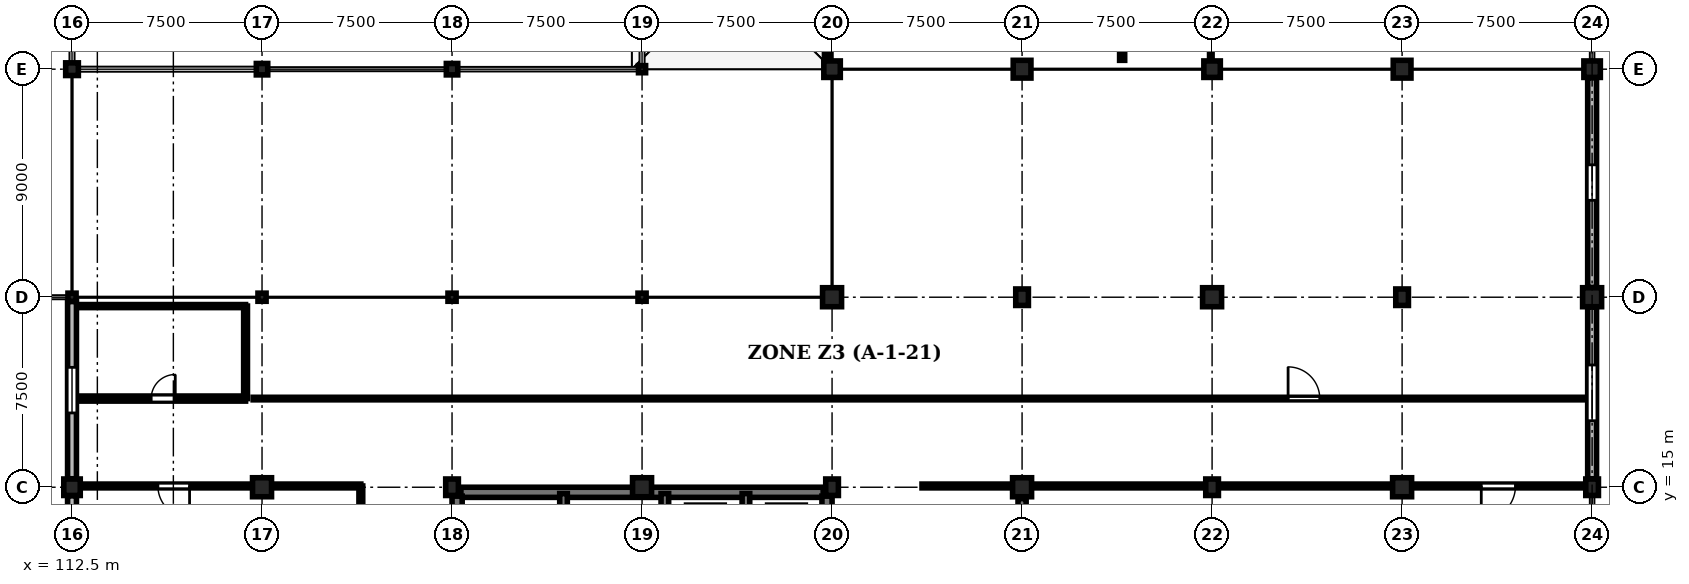
"""IFC4 building model, lengths in metres.
Left out: names, types, materials, properties, quantities, classifications, styles, units other than length and angle.
Written with IfcOpenShell. Run it as: python <this file> out.ifc"""

import sys

from ifc_helpers import new_model, si_unit, direction, frame, frame_2d, origin, origin_2d, place, context, subcontext, project, spatial, rectangle, extrude, element, fill, save


model = new_model("IFC4")
c1 = context("Model", 3, precision=1e-05, world=origin(), true_north=direction((0.0, 1.0)))
c2 = subcontext(c1, "Body", "Model", "MODEL_VIEW")
j1 = project(units=[si_unit("LENGTHUNIT", "METRE"), si_unit("PLANEANGLEUNIT", "RADIAN")], contexts=[c1])
p1 = place(None, origin())
s1 = spatial("IfcSite", under=j1, at=p1, CompositionType="ELEMENT")
p2 = place(p1, origin())
s2 = spatial("IfcBuilding", under=s1, at=p2, CompositionType="ELEMENT")
p3 = place(p2, frame((0.0, 0.0, 4.8)))
s3 = spatial("IfcBuildingStorey", under=s2, at=p3, CompositionType="ELEMENT", Elevation=4.8)
p4 = place(p3, frame((112.5, 15.0, 0.0), z_axis=(0.0, 0.0, 1.0), x_axis=(1.0, 0.0, 0.0)))
e1 = element("IfcColumn", 1, at=p4, inside=s3, PredefinedType="COLUMN", context=c2, shape_type="SweptSolid", body=[
    extrude(rectangle(XDim=0.65, YDim=0.65, at=origin_2d()), origin(), (0.0, 0.0, 1.0), 4.5),
])
p5 = place(p3, frame((112.5, 22.5, 0.0), z_axis=(0.0, 0.0, 1.0), x_axis=(1.0, 0.0, 0.0)))
e2 = element("IfcColumn", 2, at=p5, inside=s3, PredefinedType="COLUMN", context=c2, shape_type="SweptSolid", body=[
    extrude(rectangle(XDim=0.32, YDim=0.32, at=origin_2d()), origin(), (0.0, 0.0, 1.0), 4.5),
])
p6 = place(p3, frame((112.5, 31.5, 0.0), z_axis=(0.0, 0.0, 1.0), x_axis=(1.0, 0.0, 0.0)))
e3 = element("IfcColumn", 3, at=p6, inside=s3, PredefinedType="COLUMN", context=c2, shape_type="SweptSolid", body=[
    extrude(rectangle(XDim=0.5, YDim=0.5, at=origin_2d()), origin(), (0.0, 0.0, 1.0), 4.5),
])
p7 = place(p3, frame((120.0, 15.0, 0.0), z_axis=(0.0, 0.0, 1.0), x_axis=(1.0, 0.0, 0.0)))
e4 = element("IfcColumn", 4, at=p7, inside=s3, PredefinedType="COLUMN", context=c2, shape_type="SweptSolid", body=[
    extrude(rectangle(XDim=0.75, YDim=0.75, at=origin_2d()), origin(), (0.0, 0.0, 1.0), 4.5),
])
p8 = place(p3, frame((120.0, 22.5, 0.0), z_axis=(0.0, 0.0, 1.0), x_axis=(1.0, 0.0, 0.0)))
e5 = element("IfcColumn", 5, at=p8, inside=s3, PredefinedType="COLUMN", context=c2, shape_type="SweptSolid", body=[
    extrude(rectangle(XDim=0.32, YDim=0.32, at=origin_2d()), origin(), (0.0, 0.0, 1.0), 4.5),
])
p9 = place(p3, frame((120.0, 31.5, 0.0), z_axis=(0.0, 0.0, 1.0), x_axis=(1.0, 0.0, 0.0)))
e6 = element("IfcColumn", 6, at=p9, inside=s3, PredefinedType="COLUMN", context=c2, shape_type="SweptSolid", body=[
    extrude(rectangle(XDim=0.45, YDim=0.45, at=origin_2d()), origin(), (0.0, 0.0, 1.0), 4.5),
])
p10 = place(p3, frame((127.5, 15.0, 0.0), z_axis=(0.0, 0.0, 1.0), x_axis=(1.0, 0.0, 0.0)))
e7 = element("IfcColumn", 7, at=p10, inside=s3, PredefinedType="COLUMN", context=c2, shape_type="SweptSolid", body=[
    extrude(rectangle(XDim=0.5, YDim=0.65, at=origin_2d()), origin(), (0.0, 0.0, 1.0), 4.5),
])
p11 = place(p3, frame((127.5, 22.5, 0.0), z_axis=(0.0, 0.0, 1.0), x_axis=(1.0, 0.0, 0.0)))
e8 = element("IfcColumn", 8, at=p11, inside=s3, PredefinedType="COLUMN", context=c2, shape_type="SweptSolid", body=[
    extrude(rectangle(XDim=0.32, YDim=0.32, at=origin_2d()), origin(), (0.0, 0.0, 1.0), 4.5),
])
p12 = place(p3, frame((127.5, 31.5, 0.0), z_axis=(0.0, 0.0, 1.0), x_axis=(1.0, 0.0, 0.0)))
e9 = element("IfcColumn", 9, at=p12, inside=s3, PredefinedType="COLUMN", context=c2, shape_type="SweptSolid", body=[
    extrude(rectangle(XDim=0.45, YDim=0.45, at=origin_2d()), origin(), (0.0, 0.0, 1.0), 4.5),
])
p13 = place(p3, frame((135.0, 15.0, 0.0), z_axis=(0.0, 0.0, 1.0), x_axis=(1.0, 0.0, 0.0)))
e10 = element("IfcColumn", 10, at=p13, inside=s3, PredefinedType="COLUMN", context=c2, shape_type="SweptSolid", body=[
    extrude(rectangle(XDim=0.75, YDim=0.75, at=origin_2d()), origin(), (0.0, 0.0, 1.0), 4.5),
])
p14 = place(p3, frame((135.0, 22.5, 0.0), z_axis=(0.0, 0.0, 1.0), x_axis=(1.0, 0.0, 0.0)))
e11 = element("IfcColumn", 11, at=p14, inside=s3, PredefinedType="COLUMN", context=c2, shape_type="SweptSolid", body=[
    extrude(rectangle(XDim=0.32, YDim=0.32, at=origin_2d()), origin(), (0.0, 0.0, 1.0), 4.5),
])
p15 = place(p3, frame((135.0, 31.5, 0.0), z_axis=(0.0, 0.0, 1.0), x_axis=(1.0, 0.0, 0.0)))
e12 = element("IfcColumn", 12, at=p15, inside=s3, PredefinedType="COLUMN", context=c2, shape_type="SweptSolid", body=[
    extrude(rectangle(XDim=0.28, YDim=0.28, at=origin_2d()), origin(), (0.0, 0.0, 1.0), 4.5),
])
p16 = place(p3, frame((142.5, 15.0, 0.0), z_axis=(0.0, 0.0, 1.0), x_axis=(1.0, 0.0, 0.0)))
e13 = element("IfcColumn", 13, at=p16, inside=s3, PredefinedType="COLUMN", context=c2, shape_type="SweptSolid", body=[
    extrude(rectangle(XDim=0.5, YDim=0.65, at=origin_2d()), origin(), (0.0, 0.0, 1.0), 4.5),
])
p17 = place(p3, frame((142.5, 22.5, 0.0), z_axis=(0.0, 0.0, 1.0), x_axis=(1.0, 0.0, 0.0)))
e14 = element("IfcColumn", 14, at=p17, inside=s3, PredefinedType="COLUMN", context=c2, shape_type="SweptSolid", body=[
    extrude(rectangle(XDim=0.75, YDim=0.75, at=origin_2d()), origin(), (0.0, 0.0, 1.0), 4.5),
])
p18 = place(p3, frame((142.5, 31.5, 0.0), z_axis=(0.0, 0.0, 1.0), x_axis=(1.0, 0.0, 0.0)))
e15 = element("IfcColumn", 15, at=p18, inside=s3, PredefinedType="COLUMN", context=c2, shape_type="SweptSolid", body=[
    extrude(rectangle(XDim=0.65, YDim=0.65, at=origin_2d()), origin(), (0.0, 0.0, 1.0), 4.5),
])
p19 = place(p3, frame((150.0, 15.0, 0.0), z_axis=(0.0, 0.0, 1.0), x_axis=(1.0, 0.0, 0.0)))
e16 = element("IfcColumn", 16, at=p19, inside=s3, PredefinedType="COLUMN", context=c2, shape_type="SweptSolid", body=[
    extrude(rectangle(XDim=0.75, YDim=0.75, at=origin_2d()), origin(), (0.0, 0.0, 1.0), 4.5),
])
p20 = place(p3, frame((150.0, 22.5, 0.0), z_axis=(0.0, 0.0, 1.0), x_axis=(1.0, 0.0, 0.0)))
e17 = element("IfcColumn", 17, at=p20, inside=s3, PredefinedType="COLUMN", context=c2, shape_type="SweptSolid", body=[
    extrude(rectangle(XDim=0.5, YDim=0.65, at=origin_2d()), origin(), (0.0, 0.0, 1.0), 4.5),
])
p21 = place(p3, frame((150.0, 31.5, 0.0), z_axis=(0.0, 0.0, 1.0), x_axis=(1.0, 0.0, 0.0)))
e18 = element("IfcColumn", 18, at=p21, inside=s3, PredefinedType="COLUMN", context=c2, shape_type="SweptSolid", body=[
    extrude(rectangle(XDim=0.7, YDim=0.7, at=origin_2d()), origin(), (0.0, 0.0, 1.0), 4.5),
])
p22 = place(p3, frame((157.5, 15.0, 0.0), z_axis=(0.0, 0.0, 1.0), x_axis=(1.0, 0.0, 0.0)))
e19 = element("IfcColumn", 19, at=p22, inside=s3, PredefinedType="COLUMN", context=c2, shape_type="SweptSolid", body=[
    extrude(rectangle(XDim=0.5, YDim=0.65, at=origin_2d()), origin(), (0.0, 0.0, 1.0), 4.5),
])
p23 = place(p3, frame((157.5, 22.5, 0.0), z_axis=(0.0, 0.0, 1.0), x_axis=(1.0, 0.0, 0.0)))
e20 = element("IfcColumn", 20, at=p23, inside=s3, PredefinedType="COLUMN", context=c2, shape_type="SweptSolid", body=[
    extrude(rectangle(XDim=0.75, YDim=0.75, at=origin_2d()), origin(), (0.0, 0.0, 1.0), 4.5),
])
p24 = place(p3, frame((157.5, 31.5, 0.0), z_axis=(0.0, 0.0, 1.0), x_axis=(1.0, 0.0, 0.0)))
e21 = element("IfcColumn", 21, at=p24, inside=s3, PredefinedType="COLUMN", context=c2, shape_type="SweptSolid", body=[
    extrude(rectangle(XDim=0.65, YDim=0.65, at=origin_2d()), origin(), (0.0, 0.0, 1.0), 4.5),
])
p25 = place(p3, frame((165.0, 15.0, 0.0), z_axis=(0.0, 0.0, 1.0), x_axis=(1.0, 0.0, 0.0)))
e22 = element("IfcColumn", 22, at=p25, inside=s3, PredefinedType="COLUMN", context=c2, shape_type="SweptSolid", body=[
    extrude(rectangle(XDim=0.75, YDim=0.75, at=origin_2d()), origin(), (0.0, 0.0, 1.0), 4.5),
])
p26 = place(p3, frame((165.0, 22.5, 0.0), z_axis=(0.0, 0.0, 1.0), x_axis=(1.0, 0.0, 0.0)))
e23 = element("IfcColumn", 23, at=p26, inside=s3, PredefinedType="COLUMN", context=c2, shape_type="SweptSolid", body=[
    extrude(rectangle(XDim=0.5, YDim=0.65, at=origin_2d()), origin(), (0.0, 0.0, 1.0), 4.5),
])
p27 = place(p3, frame((165.0, 31.5, 0.0), z_axis=(0.0, 0.0, 1.0), x_axis=(1.0, 0.0, 0.0)))
e24 = element("IfcColumn", 24, at=p27, inside=s3, PredefinedType="COLUMN", context=c2, shape_type="SweptSolid", body=[
    extrude(rectangle(XDim=0.7, YDim=0.7, at=origin_2d()), origin(), (0.0, 0.0, 1.0), 4.5),
])
p28 = place(p3, frame((172.5, 15.0, 0.0), z_axis=(0.0, 0.0, 1.0), x_axis=(1.0, 0.0, 0.0)))
e25 = element("IfcColumn", 25, at=p28, inside=s3, PredefinedType="COLUMN", context=c2, shape_type="SweptSolid", body=[
    extrude(rectangle(XDim=0.5, YDim=0.65, at=origin_2d()), origin(), (0.0, 0.0, 1.0), 4.5),
])
p29 = place(p3, frame((172.5, 22.5, 0.0), z_axis=(0.0, 0.0, 1.0), x_axis=(1.0, 0.0, 0.0)))
e26 = element("IfcColumn", 26, at=p29, inside=s3, PredefinedType="COLUMN", context=c2, shape_type="SweptSolid", body=[
    extrude(rectangle(XDim=0.75, YDim=0.75, at=origin_2d()), origin(), (0.0, 0.0, 1.0), 4.5),
])
p30 = place(p3, frame((172.5, 31.5, 0.0), z_axis=(0.0, 0.0, 1.0), x_axis=(1.0, 0.0, 0.0)))
e27 = element("IfcColumn", 27, at=p30, inside=s3, PredefinedType="COLUMN", context=c2, shape_type="SweptSolid", body=[
    extrude(rectangle(XDim=0.65, YDim=0.65, at=origin_2d()), origin(), (0.0, 0.0, 1.0), 4.5),
])
p31 = place(p3, frame((150.0, 7.95, 0.0), z_axis=(0.0, 0.0, 1.0), x_axis=(0.0, 1.0, 0.0)))
e28 = element("IfcWall", 28, at=p31, inside=s3, PredefinedType="SHEAR", context=c2, shape_type="SweptSolid", body=[
    extrude(rectangle(XDim=6.6, YDim=0.32, at=frame_2d((3.3, 0.0))), origin(), (0.0, 0.0, 1.0), 3.63),
])
p32 = place(p3, frame((112.5, 7.86, 0.0), z_axis=(0.0, 0.0, 1.0), x_axis=(0.0, 1.0, 0.0)))
e29 = element("IfcWall", 29, at=p32, inside=s3, PredefinedType="STANDARD", context=c2, shape_type="SweptSolid", body=[
    extrude(rectangle(XDim=6.805, YDim=0.35, at=frame_2d((3.402, 0.0))), origin(), (0.0, 0.0, 1.0), 3.63),
])
p33 = place(p32, frame((2.202, 0.0, 0.9)))
e30 = element("IfcOpeningElement", 30, at=p33, cuts=e29, PredefinedType="OPENING", context=c2, shape_type="SweptSolid", body=[
    extrude(rectangle(XDim=2.4, YDim=2.45, at=frame_2d((1.2, 1.225))), frame((0.0, 0.185, 0.0), z_axis=(0.0, -1.0, 0.0), x_axis=(1.0, 0.0, 0.0)), (0.0, 0.0, 1.0), 0.37),
])
p34 = place(p3, frame((112.5, 15.335, 0.0), z_axis=(0.0, 0.0, 1.0), x_axis=(0.0, 1.0, 0.0)))
e31 = element("IfcWall", 31, at=p34, inside=s3, PredefinedType="STANDARD", context=c2, shape_type="SweptSolid", body=[
    extrude(rectangle(XDim=6.995, YDim=0.35, at=frame_2d((3.498, 0.0))), origin(), (0.0, 0.0, 1.0), 3.63),
])
p35 = place(p34, frame((2.597, 0.0, 0.9)))
e32 = element("IfcOpeningElement", 32, at=p35, cuts=e31, PredefinedType="OPENING", context=c2, shape_type="SweptSolid", body=[
    extrude(rectangle(XDim=1.8, YDim=2.1, at=frame_2d((0.9, 1.05))), frame((0.0, 0.185, 0.0), z_axis=(0.0, -1.0, 0.0), x_axis=(1.0, 0.0, 0.0)), (0.0, 0.0, 1.0), 0.37),
])
p36 = place(p3, frame((172.5, 22.115, 0.0), z_axis=(0.0, 0.0, 1.0), x_axis=(0.0, -1.0, 0.0)))
e33 = element("IfcWall", 33, at=p36, inside=s3, PredefinedType="STANDARD", context=c2, shape_type="SweptSolid", body=[
    extrude(rectangle(XDim=6.78, YDim=0.35, at=frame_2d((3.39, 0.0))), origin(), (0.0, 0.0, 1.0), 3.63),
])
p37 = place(p36, frame((2.29, 0.0, 0.9)))
e34 = element("IfcOpeningElement", 34, at=p37, cuts=e33, PredefinedType="OPENING", context=c2, shape_type="SweptSolid", body=[
    extrude(rectangle(XDim=2.2, YDim=1.95, at=frame_2d((1.1, 0.975))), frame((0.0, 0.185, 0.0), z_axis=(0.0, -1.0, 0.0), x_axis=(1.0, 0.0, 0.0)), (0.0, 0.0, 1.0), 0.37),
])
p38 = place(p3, frame((172.5, 31.165, 0.0), z_axis=(0.0, 0.0, 1.0), x_axis=(0.0, -1.0, 0.0)))
e35 = element("IfcWall", 35, at=p38, inside=s3, PredefinedType="STANDARD", context=c2, shape_type="SweptSolid", body=[
    extrude(rectangle(XDim=8.28, YDim=0.35, at=frame_2d((4.14, 0.0))), origin(), (0.0, 0.0, 1.0), 3.63),
])
p39 = place(p38, frame((3.44, 0.0, 0.9)))
e36 = element("IfcOpeningElement", 36, at=p39, cuts=e35, PredefinedType="OPENING", context=c2, shape_type="SweptSolid", body=[
    extrude(rectangle(XDim=1.4, YDim=1.8, at=frame_2d((0.7, 0.9))), frame((0.0, 0.185, 0.0), z_axis=(0.0, -1.0, 0.0), x_axis=(1.0, 0.0, 0.0)), (0.0, 0.0, 1.0), 0.37),
])
p40 = place(p3, frame((127.85, 14.8, 0.0), z_axis=(0.0, 0.0, 1.0), x_axis=(1.0, 0.0, 0.0)))
e37 = element("IfcWall", 37, at=p40, inside=s3, PredefinedType="SHEAR", context=c2, shape_type="SweptSolid", body=[
    extrude(rectangle(XDim=14.3, YDim=0.4, at=frame_2d((7.15, 0.0))), origin(), (0.0, 0.0, 1.0), 4.18),
])
p41 = place(p3, frame((127.7, 7.85, 0.0), z_axis=(0.0, 0.0, 1.0), x_axis=(0.0, 1.0, 0.0)))
e38 = element("IfcWall", 38, at=p41, inside=s3, PredefinedType="SHEAR", context=c2, shape_type="SweptSolid", body=[
    extrude(rectangle(XDim=6.8, YDim=0.4, at=frame_2d((3.4, 0.0))), origin(), (0.0, 0.0, 1.0), 4.18),
])
p42 = place(p3, frame((142.3, 11.6, 0.0), z_axis=(0.0, 0.0, 1.0), x_axis=(0.0, 1.0, 0.0)))
e39 = element("IfcWall", 39, at=p42, inside=s3, PredefinedType="SHEAR", context=c2, shape_type="SweptSolid", body=[
    extrude(rectangle(XDim=3.05, YDim=0.4, at=frame_2d((1.525, 0.0))), origin(), (0.0, 0.0, 1.0), 4.18),
])
for number, where, z_axis, x_axis in (
    (40, (131.9, 11.6, 0.0), (0.0, 0.0, 1.0), (0.0, 1.0, 0.0)),
    (41, (135.9, 11.6, 0.0), (0.0, 0.0, 1.0), (0.0, 1.0, 0.0)),
    (42, (139.1, 11.6, 0.0), (0.0, 0.0, 1.0), (0.0, 1.0, 0.0)),
):
    element("IfcWall", number, at=place(p3, frame(where, z_axis=z_axis, x_axis=x_axis)), inside=s3, PredefinedType="SHEAR", context=c2, shape_type="SweptSolid", body=[
        extrude(rectangle(XDim=3.15, YDim=0.3, at=frame_2d((1.575, 0.0))), origin(), (0.0, 0.0, 1.0), 4.18),
    ])
p43 = place(p3, frame((142.3, 31.5, 0.0), z_axis=(0.0, 0.0, 1.0), x_axis=(0.0, 1.0, 0.0)))
e43 = element("IfcWall", 43, at=p43, inside=s3, PredefinedType="STANDARD", context=c2, shape_type="SweptSolid", body=[
    extrude(rectangle(XDim=44.65, YDim=0.2, at=frame_2d((22.325, 0.0))), origin(), (0.0, 0.0, 1.0), 3.615),
])
p44 = place(p43, frame((26.11, 0.0, 0.0)))
e44 = element("IfcOpeningElement", 44, at=p44, cuts=e43, PredefinedType="OPENING", context=c2, shape_type="SweptSolid", body=[
    extrude(rectangle(XDim=1.05, YDim=2.2, at=frame_2d((0.525, 1.1))), frame((0.0, 0.11, 0.0), z_axis=(0.0, -1.0, 0.0), x_axis=(1.0, 0.0, 0.0)), (0.0, 0.0, 1.0), 0.22),
])
p45 = place(p3, frame((172.15, 15.05, 0.0), z_axis=(0.0, 0.0, 1.0), x_axis=(-1.0, 0.0, 0.0)))
e45 = element("IfcWall", 45, at=p45, inside=s3, PredefinedType="PARTITIONING", context=c2, shape_type="SweptSolid", body=[
    extrude(rectangle(XDim=26.1, YDim=0.15, at=frame_2d((13.05, 0.0))), origin(), (0.0, 0.0, 1.0), 3.515),
])
p46 = place(p45, frame((2.675, 0.0, 0.0)))
e46 = element("IfcOpeningElement", 46, at=p46, cuts=e45, PredefinedType="OPENING", context=c2, shape_type="SweptSolid", body=[
    extrude(rectangle(XDim=1.35, YDim=2.25, at=frame_2d((0.675, 1.125))), frame((0.0, 0.085, 0.0), z_axis=(0.0, -1.0, 0.0), x_axis=(1.0, 0.0, 0.0)), (0.0, 0.0, 1.0), 0.17),
])
p47 = place(p3, frame((123.9, 15.05, 0.0), z_axis=(0.0, 0.0, 1.0), x_axis=(-1.0, 0.0, 0.0)))
e47 = element("IfcWall", 47, at=p47, inside=s3, PredefinedType="PARTITIONING", context=c2, shape_type="SweptSolid", body=[
    extrude(rectangle(XDim=11.05, YDim=0.15, at=frame_2d((5.525, 0.0))), origin(), (0.0, 0.0, 1.0), 3.515),
])
p48 = place(p47, frame((6.76, 0.0, 0.0)))
e48 = element("IfcOpeningElement", 48, at=p48, cuts=e47, PredefinedType="OPENING", context=c2, shape_type="SweptSolid", body=[
    extrude(rectangle(XDim=1.25, YDim=2.2, at=frame_2d((0.625, 1.1))), frame((0.0, 0.085, 0.0), z_axis=(0.0, -1.0, 0.0), x_axis=(1.0, 0.0, 0.0)), (0.0, 0.0, 1.0), 0.17),
])
p49 = place(p3, frame((112.85, 18.5, 0.0), z_axis=(0.0, 0.0, 1.0), x_axis=(1.0, 0.0, 0.0)))
e49 = element("IfcWall", 49, at=p49, inside=s3, PredefinedType="STANDARD", context=c2, shape_type="SweptSolid", body=[
    extrude(rectangle(XDim=6.5, YDim=0.2, at=frame_2d((3.25, 0.0))), origin(), (0.0, 0.0, 1.0), 4.165),
])
p50 = place(p49, frame((2.775, 0.0, 0.0)))
e50 = element("IfcOpeningElement", 50, at=p50, cuts=e49, PredefinedType="OPENING", context=c2, shape_type="SweptSolid", body=[
    extrude(rectangle(XDim=0.95, YDim=2.15, at=frame_2d((0.475, 1.075))), frame((0.0, 0.11, 0.0), z_axis=(0.0, -1.0, 0.0), x_axis=(1.0, 0.0, 0.0)), (0.0, 0.0, 1.0), 0.22),
])
p51 = place(p3, frame((119.65, 18.5, 0.0), z_axis=(0.0, 0.0, 1.0), x_axis=(1.0, 0.0, 0.0)))
e51 = element("IfcWall", 51, at=p51, inside=s3, PredefinedType="PARTITIONING", context=c2, shape_type="SweptSolid", body=[
    extrude(rectangle(XDim=52.5, YDim=0.1, at=frame_2d((26.25, 0.0))), origin(), (0.0, 0.0, 1.0), 4.165),
])
p52 = place(p51, frame((40.85, 0.0, 0.0)))
e52 = element("IfcOpeningElement", 52, at=p52, cuts=e51, PredefinedType="OPENING", context=c2, shape_type="SweptSolid", body=[
    extrude(rectangle(XDim=1.25, YDim=2.2, at=frame_2d((0.625, 1.1))), frame((0.0, 0.06, 0.0), z_axis=(0.0, -1.0, 0.0), x_axis=(1.0, 0.0, 0.0)), (0.0, 0.0, 1.0), 0.12),
])
p53 = place(p3, frame((153.95, 31.85, 0.0), z_axis=(0.0, 0.0, 1.0), x_axis=(0.0, 1.0, 0.0)))
e53 = element("IfcWall", 53, at=p53, inside=s3, PredefinedType="STANDARD", context=c2, shape_type="SweptSolid", body=[
    extrude(rectangle(XDim=16.15, YDim=0.2, at=frame_2d((8.075, 0.0))), origin(), (0.0, 0.0, 1.0), 3.765),
])
p54 = place(p53, frame((10.47, 0.0, 0.0)))
e54 = element("IfcOpeningElement", 54, at=p54, cuts=e53, PredefinedType="OPENING", context=c2, shape_type="SweptSolid", body=[
    extrude(rectangle(XDim=1.05, YDim=2.2, at=frame_2d((0.525, 1.1))), frame((0.0, 0.11, 0.0), z_axis=(0.0, -1.0, 0.0), x_axis=(1.0, 0.0, 0.0)), (0.0, 0.0, 1.0), 0.22),
])
p55 = place(p3, frame((157.45, 38.75, 0.0), z_axis=(0.0, 0.0, 1.0), x_axis=(0.0, -1.0, 0.0)))
e55 = element("IfcWall", 55, at=p55, inside=s3, PredefinedType="PARTITIONING", context=c2, shape_type="SweptSolid", body=[
    extrude(rectangle(XDim=6.9, YDim=0.1, at=frame_2d((3.45, 0.0))), origin(), (0.0, 0.0, 1.0), 3.565),
])
p56 = place(p55, frame((2.925, 0.0, 0.0)))
e56 = element("IfcOpeningElement", 56, at=p56, cuts=e55, PredefinedType="OPENING", context=c2, shape_type="SweptSolid", body=[
    extrude(rectangle(XDim=1.05, YDim=2.2, at=frame_2d((0.525, 1.1))), frame((0.0, 0.06, 0.0), z_axis=(0.0, -1.0, 0.0), x_axis=(1.0, 0.0, 0.0)), (0.0, 0.0, 1.0), 0.12),
])
p57 = place(p3, frame((123.9, 7.85, 0.0), z_axis=(0.0, 0.0, 1.0), x_axis=(0.0, 1.0, 0.0)))
e57 = element("IfcWall", 57, at=p57, inside=s3, PredefinedType="PARTITIONING", context=c2, shape_type="SweptSolid", body=[
    extrude(rectangle(XDim=7.2, YDim=0.15, at=frame_2d((3.6, 0.0))), origin(), (0.0, 0.0, 1.0), 4.165),
])
p58 = place(p3, frame((119.35, 18.5, 0.0), z_axis=(0.0, 0.0, 1.0), x_axis=(0.0, 1.0, 0.0)))
e58 = element("IfcWall", 58, at=p58, inside=s3, PredefinedType="PARTITIONING", context=c2, shape_type="SweptSolid", body=[
    extrude(rectangle(XDim=3.65, YDim=0.15, at=frame_2d((1.825, 0.0))), origin(), (0.0, 0.0, 1.0), 4.165),
])
p59 = place(p3, frame((112.85, 22.15, 0.0), z_axis=(0.0, 0.0, 1.0), x_axis=(1.0, 0.0, 0.0)))
e59 = element("IfcWall", 59, at=p59, inside=s3, PredefinedType="PARTITIONING", context=c2, shape_type="SweptSolid", body=[
    extrude(rectangle(XDim=6.5, YDim=0.12, at=frame_2d((3.25, 0.0))), origin(), (0.0, 0.0, 1.0), 3.565),
])
p60 = place(p35, origin())
e60 = element("IfcWindow", 60, at=p60, inside=s3, PartitioningType="SINGLE_PANEL", PredefinedType="WINDOW", context=c2, shape_type="SweptSolid", body=[
    extrude(rectangle(XDim=1.8, YDim=2.1, at=frame_2d((0.9, 1.05))), frame((0.0, 0.03, 0.0), z_axis=(0.0, -1.0, 0.0), x_axis=(1.0, 0.0, 0.0)), (0.0, 0.0, 1.0), 0.06),
])
fill(e32, e60)
p61 = place(p37, origin())
e61 = element("IfcWindow", 61, at=p61, inside=s3, PartitioningType="SINGLE_PANEL", PredefinedType="WINDOW", context=c2, shape_type="SweptSolid", body=[
    extrude(rectangle(XDim=2.2, YDim=1.95, at=frame_2d((1.1, 0.975))), frame((0.0, 0.03, 0.0), z_axis=(0.0, -1.0, 0.0), x_axis=(1.0, 0.0, 0.0)), (0.0, 0.0, 1.0), 0.06),
])
fill(e34, e61)
p62 = place(p39, origin())
e62 = element("IfcWindow", 62, at=p62, inside=s3, PartitioningType="SINGLE_PANEL", PredefinedType="WINDOW", context=c2, shape_type="SweptSolid", body=[
    extrude(rectangle(XDim=1.4, YDim=1.8, at=frame_2d((0.7, 0.9))), frame((0.0, 0.03, 0.0), z_axis=(0.0, -1.0, 0.0), x_axis=(1.0, 0.0, 0.0)), (0.0, 0.0, 1.0), 0.06),
])
fill(e36, e62)
p63 = place(p46, origin())
e63 = element("IfcDoor", 63, at=p63, inside=s3, OperationType="SINGLE_SWING_RIGHT", PredefinedType="DOOR", context=c2, shape_type="SweptSolid", body=[
    extrude(rectangle(XDim=1.35, YDim=2.25, at=frame_2d((0.675, 1.125))), frame((0.0, 0.025, 0.0), z_axis=(0.0, -1.0, 0.0), x_axis=(1.0, 0.0, 0.0)), (0.0, 0.0, 1.0), 0.05),
])
fill(e46, e63)
p64 = place(p48, origin())
e64 = element("IfcDoor", 64, at=p64, inside=s3, OperationType="SINGLE_SWING_LEFT", PredefinedType="DOOR", context=c2, shape_type="SweptSolid", body=[
    extrude(rectangle(XDim=1.25, YDim=2.2, at=frame_2d((0.625, 1.1))), frame((0.0, 0.025, 0.0), z_axis=(0.0, -1.0, 0.0), x_axis=(1.0, 0.0, 0.0)), (0.0, 0.0, 1.0), 0.05),
])
fill(e48, e64)
p65 = place(p50, origin())
e65 = element("IfcDoor", 65, at=p65, inside=s3, OperationType="SINGLE_SWING_RIGHT", PredefinedType="DOOR", context=c2, shape_type="SweptSolid", body=[
    extrude(rectangle(XDim=0.95, YDim=2.15, at=frame_2d((0.475, 1.075))), frame((0.0, 0.025, 0.0), z_axis=(0.0, -1.0, 0.0), x_axis=(1.0, 0.0, 0.0)), (0.0, 0.0, 1.0), 0.05),
])
fill(e50, e65)
p66 = place(p52, origin())
e66 = element("IfcDoor", 66, at=p66, inside=s3, OperationType="SINGLE_SWING_LEFT", PredefinedType="DOOR", context=c2, shape_type="SweptSolid", body=[
    extrude(rectangle(XDim=1.25, YDim=2.2, at=frame_2d((0.625, 1.1))), frame((0.0, 0.025, 0.0), z_axis=(0.0, -1.0, 0.0), x_axis=(1.0, 0.0, 0.0)), (0.0, 0.0, 1.0), 0.05),
])
fill(e52, e66)
save(model, sys.argv[1])
